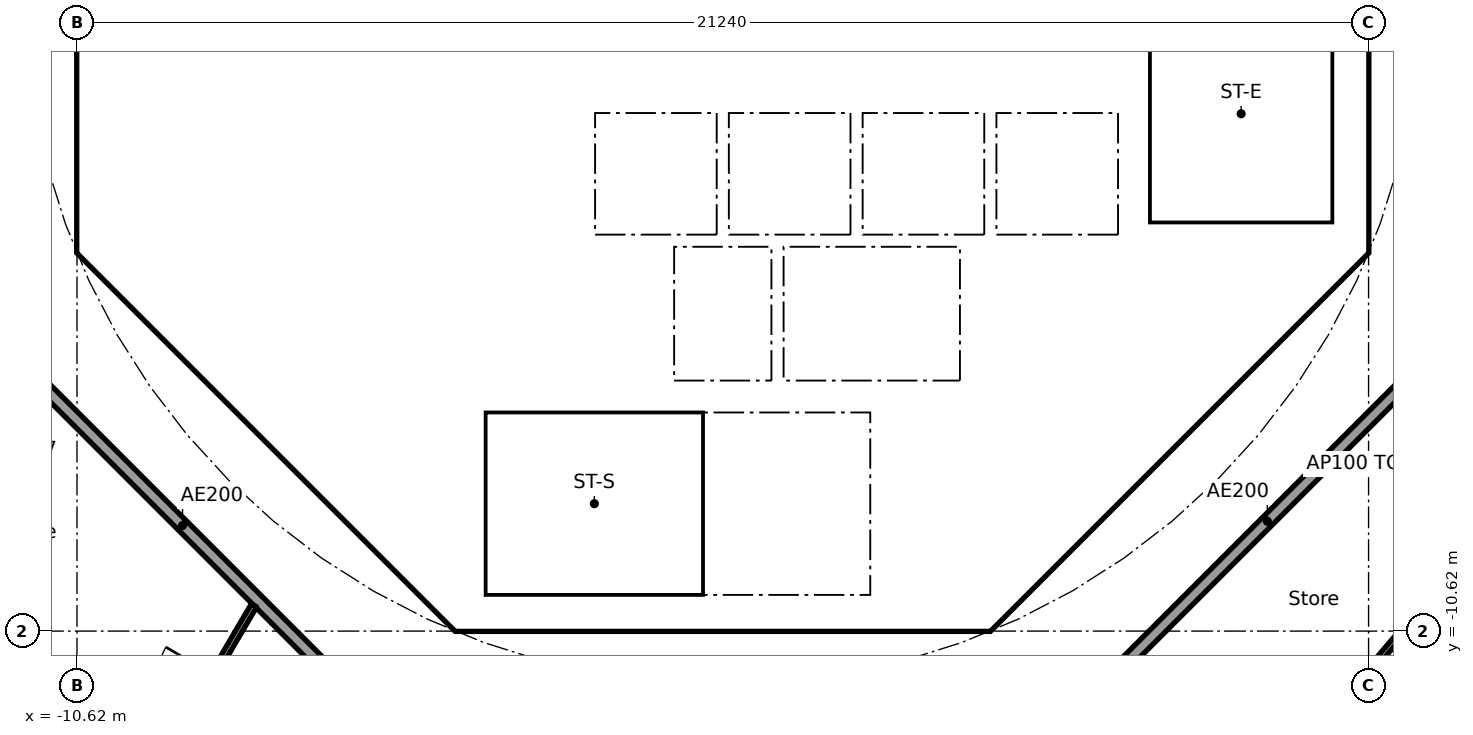
"""IFC4 building model, lengths in metres.
Left out: names, types, materials, properties, quantities, classifications, styles, units other than length and angle.
Written with IfcOpenShell. Run it as: python <this file> out.ifc"""

import sys

from ifc_helpers import new_model, si_unit, direction, frame, frame_2d, origin, place, context, subcontext, project, spatial, polyline, rectangle, outline, extrude, element, fill, save


model = new_model("IFC4")
c1 = context("Model", 3, precision=1e-05, world=origin(), true_north=direction((0.0, 1.0)))
c2 = subcontext(c1, "Body", "Model", "MODEL_VIEW")
j1 = project(units=[si_unit("LENGTHUNIT", "METRE"), si_unit("PLANEANGLEUNIT", "RADIAN")], contexts=[c1])
p1 = place(None, origin())
s1 = spatial("IfcSite", under=j1, at=p1, CompositionType="ELEMENT")
p2 = place(p1, origin())
s2 = spatial("IfcBuilding", under=s1, at=p2, CompositionType="ELEMENT")
p3 = place(p2, frame((0.0, 0.0, 227.0)))
s3 = spatial("IfcBuildingStorey", under=s2, at=p3, CompositionType="ELEMENT", Elevation=227.0)
p4 = place(p3, frame((-10.325, 3.801, 0.0), z_axis=(0.0, 0.0, 1.0), x_axis=(0.0, -1.0, 0.0)))
e1 = element("IfcWall", 1, at=p4, inside=s3, PredefinedType="SHEAR", context=c2, shape_type="SweptSolid", body=[
    extrude(rectangle(XDim=7.602, YDim=0.6, at=frame_2d((3.801, 0.0))), origin(), (0.0, 0.0, 1.0), 3.44),
])
p5 = place(p4, frame((0.651, 0.0, 0.0)))
e2 = element("IfcOpeningElement", 2, at=p5, cuts=e1, PredefinedType="OPENING", context=c2, shape_type="SweptSolid", body=[
    extrude(rectangle(XDim=1.5, YDim=2.1, at=frame_2d((0.75, 1.05))), frame((0.0, 0.31, 0.0), z_axis=(0.0, -1.0, 0.0), x_axis=(1.0, 0.0, 0.0)), (0.0, 0.0, 1.0), 0.62),
])
p6 = place(p4, frame((5.451, 0.0, 0.0)))
e3 = element("IfcOpeningElement", 3, at=p6, cuts=e1, PredefinedType="OPENING", context=c2, shape_type="SweptSolid", body=[
    extrude(rectangle(XDim=1.5, YDim=2.1, at=frame_2d((0.75, 1.05))), frame((0.0, 0.31, 0.0), z_axis=(0.0, -1.0, 0.0), x_axis=(1.0, 0.0, 0.0)), (0.0, 0.0, 1.0), 0.62),
])
p7 = place(p3, frame((-9.988, -4.613, 0.0), z_axis=(0.0, 0.0, 1.0), x_axis=(0.707106781187, -0.707106781187, 0.0)))
e4 = element("IfcWall", 4, at=p7, inside=s3, PredefinedType="SHEAR", context=c2, shape_type="SweptSolid", body=[
    extrude(rectangle(XDim=7.602, YDim=0.6, at=frame_2d((3.801, 0.0))), origin(), (0.0, 0.0, 1.0), 3.44),
])
p8 = place(p7, frame((6.151, 0.0, 0.0)))
e5 = element("IfcOpeningElement", 5, at=p8, cuts=e4, PredefinedType="OPENING", context=c2, shape_type="SweptSolid", body=[
    extrude(rectangle(XDim=1.1, YDim=2.1, at=frame_2d((0.55, 1.05))), frame((0.0, 0.31, 0.0), z_axis=(0.0, -1.0, 0.0), x_axis=(1.0, 0.0, 0.0)), (0.0, 0.0, 1.0), 0.62),
])
p9 = place(p3, frame((4.613, -9.988, 0.0), z_axis=(0.0, 0.0, 1.0), x_axis=(0.707106781187, 0.707106781187, 0.0)))
e6 = element("IfcWall", 6, at=p9, inside=s3, PredefinedType="SHEAR", context=c2, shape_type="SweptSolid", body=[
    extrude(rectangle(XDim=7.602, YDim=0.6, at=frame_2d((3.801, 0.0))), origin(), (0.0, 0.0, 1.0), 3.44),
])
p10 = place(p9, frame((3.201, 0.0, 0.0)))
e7 = element("IfcOpeningElement", 7, at=p10, cuts=e6, PredefinedType="OPENING", context=c2, shape_type="SweptSolid", body=[
    extrude(rectangle(XDim=1.2, YDim=2.1, at=frame_2d((0.6, 1.05))), frame((0.0, 0.31, 0.0), z_axis=(0.0, -1.0, 0.0), x_axis=(1.0, 0.0, 0.0)), (0.0, 0.0, 1.0), 0.62),
])
p11 = place(p3, frame((4.0, -10.025, 0.0), z_axis=(0.0, 0.0, 1.0), x_axis=(0.0, 1.0, 0.0)))
e8 = element("IfcWall", 8, at=p11, inside=s3, PredefinedType="SOLIDWALL", context=c2, shape_type="SweptSolid", body=[
    extrude(rectangle(XDim=3.0, YDim=0.2, at=frame_2d((1.5, 0.0))), origin(), (0.0, 0.0, 1.0), 3.44),
])
p12 = place(p11, frame((0.975, 0.0, 0.0)))
e9 = element("IfcOpeningElement", 9, at=p12, cuts=e8, PredefinedType="OPENING", context=c2, shape_type="SweptSolid", body=[
    extrude(rectangle(XDim=1.1, YDim=2.1, at=frame_2d((0.55, 1.05))), frame((0.0, 0.11, 0.0), z_axis=(0.0, -1.0, 0.0), x_axis=(1.0, 0.0, 0.0)), (0.0, 0.0, 1.0), 0.22),
])
p13 = place(p3, frame((-6.6, -7.427, 0.0), z_axis=(0.0, 0.0, 1.0), x_axis=(0.0, 1.0, 0.0)))
e10 = element("IfcWall", 10, at=p13, inside=s3, PredefinedType="PARTITIONING", context=c2, shape_type="SweptSolid", body=[
    extrude(rectangle(XDim=3.127, YDim=0.15, at=frame_2d((1.563, 0.0))), origin(), (0.0, 0.0, 1.0), 3.44),
])
p14 = place(p13, frame((1.076, 0.0, 0.0)))
e11 = element("IfcOpeningElement", 11, at=p14, cuts=e10, PredefinedType="OPENING", context=c2, shape_type="SweptSolid", body=[
    extrude(rectangle(XDim=0.9, YDim=2.1, at=frame_2d((0.45, 1.05))), frame((0.0, 0.085, 0.0), z_axis=(0.0, -1.0, 0.0), x_axis=(1.0, 0.0, 0.0)), (0.0, 0.0, 1.0), 0.17),
])
p15 = place(p3, frame((4.0, -6.5, 0.0), z_axis=(0.0, 0.0, 1.0), x_axis=(0.0, 1.0, 0.0)))
e12 = element("IfcWall", 12, at=p15, inside=s3, PredefinedType="SOLIDWALL", context=c2, shape_type="SweptSolid", body=[
    extrude(rectangle(XDim=2.2, YDim=0.2, at=frame_2d((1.1, 0.0))), origin(), (0.0, 0.0, 1.0), 3.44),
])
p16 = place(p15, frame((0.55, 0.0, 0.0)))
e13 = element("IfcOpeningElement", 13, at=p16, cuts=e12, PredefinedType="OPENING", context=c2, shape_type="SweptSolid", body=[
    extrude(rectangle(XDim=1.1, YDim=2.1, at=frame_2d((0.55, 1.05))), frame((0.0, 0.11, 0.0), z_axis=(0.0, -1.0, 0.0), x_axis=(1.0, 0.0, 0.0)), (0.0, 0.0, 1.0), 0.22),
])
p17 = place(p3, frame((-4.0, -6.5, 0.0), z_axis=(0.0, 0.0, 1.0), x_axis=(0.0, 1.0, 0.0)))
e14 = element("IfcWall", 14, at=p17, inside=s3, PredefinedType="SOLIDWALL", context=c2, shape_type="SweptSolid", body=[
    extrude(rectangle(XDim=2.2, YDim=0.2, at=frame_2d((1.1, 0.0))), origin(), (0.0, 0.0, 1.0), 3.44),
])
p18 = place(p17, frame((0.65, 0.0, 0.0)))
e15 = element("IfcOpeningElement", 15, at=p18, cuts=e14, PredefinedType="OPENING", context=c2, shape_type="SweptSolid", body=[
    extrude(rectangle(XDim=0.9, YDim=2.1, at=frame_2d((0.45, 1.05))), frame((0.0, 0.11, 0.0), z_axis=(0.0, -1.0, 0.0), x_axis=(1.0, 0.0, 0.0)), (0.0, 0.0, 1.0), 0.22),
])
p19 = place(p3, frame((-6.7, -2.0, 0.0), z_axis=(0.0, 0.0, 1.0), x_axis=(1.0, 0.0, 0.0)))
e16 = element("IfcWall", 16, at=p19, inside=s3, PredefinedType="SOLIDWALL", context=c2, shape_type="SweptSolid", body=[
    extrude(rectangle(XDim=13.4, YDim=0.2, at=frame_2d((6.7, 0.0))), origin(), (0.0, 0.0, 1.0), 3.44),
])
p20 = place(p19, frame((5.05, 0.0, 0.0)))
e17 = element("IfcOpeningElement", 17, at=p20, cuts=e16, PredefinedType="OPENING", context=c2, shape_type="SweptSolid", body=[
    extrude(rectangle(XDim=1.1, YDim=2.1, at=frame_2d((0.55, 1.05))), frame((0.0, 0.11, 0.0), z_axis=(0.0, -1.0, 0.0), x_axis=(1.0, 0.0, 0.0)), (0.0, 0.0, 1.0), 0.22),
])
p21 = place(p19, frame((7.25, 0.0, 0.0)))
e18 = element("IfcOpeningElement", 18, at=p21, cuts=e16, PredefinedType="OPENING", context=c2, shape_type="SweptSolid", body=[
    extrude(rectangle(XDim=1.1, YDim=2.1, at=frame_2d((0.55, 1.05))), frame((0.0, 0.11, 0.0), z_axis=(0.0, -1.0, 0.0), x_axis=(1.0, 0.0, 0.0)), (0.0, 0.0, 1.0), 0.22),
])
p22 = place(p19, frame((1.85, 0.0, 0.0)))
e19 = element("IfcOpeningElement", 19, at=p22, cuts=e16, PredefinedType="OPENING", context=c2, shape_type="SweptSolid", body=[
    extrude(rectangle(XDim=0.9, YDim=2.1, at=frame_2d((0.45, 1.05))), frame((0.0, 0.11, 0.0), z_axis=(0.0, -1.0, 0.0), x_axis=(1.0, 0.0, 0.0)), (0.0, 0.0, 1.0), 0.22),
])
p23 = place(p3, origin())
e20 = element("IfcWall", 20, at=p23, inside=s3, PredefinedType="SHEAR", context=c2, shape_type="SweptSolid", body=[
    extrude(outline(polyline([(-10.625, -3.801), (-10.025, -3.801), (-10.025, -4.152), (-9.776, -4.401), (-10.2, -4.825), (-10.625, -4.401), (-10.625, -3.801)])), origin(), (0.0, 0.0, 1.0), 3.44),
])
p24 = place(p3, origin())
e21 = element("IfcWall", 21, at=p24, inside=s3, PredefinedType="SHEAR", context=c2, shape_type="SweptSolid", body=[
    extrude(outline(polyline([(-4.152, -10.025), (4.152, -10.025), (4.401, -9.776), (4.825, -10.2), (4.401, -10.625), (-4.401, -10.625), (-4.825, -10.2), (-4.401, -9.776), (-4.152, -10.025)])), origin(), (0.0, 0.0, 1.0), 3.44),
])
p25 = place(p3, origin())
e22 = element("IfcWall", 22, at=p25, inside=s3, PredefinedType="SHEAR", context=c2, shape_type="SweptSolid", body=[
    extrude(outline(polyline([(9.776, -4.401), (10.025, -4.152), (10.025, -3.801), (10.025, 4.152), (9.776, 4.401), (10.2, 4.825), (10.625, 4.401), (10.625, -4.401), (10.2, -4.825), (9.776, -4.401)])), origin(), (0.0, 0.0, 1.0), 3.44),
])
p26 = place(p3, frame((-10.025, -4.0, 0.0), z_axis=(0.0, 0.0, 1.0), x_axis=(1.0, 0.0, 0.0)))
e23 = element("IfcWall", 23, at=p26, inside=s3, PredefinedType="PARTITIONING", context=c2, shape_type="SweptSolid", body=[
    extrude(rectangle(XDim=3.325, YDim=0.2, at=frame_2d((1.662, 0.0))), origin(), (0.0, 0.0, 1.0), 3.44),
])
for number, where, z_axis, x_axis in (
    (24, (-0.9, -6.5, 0.0), (0.0, 0.0, 1.0), (0.0, 1.0, 0.0)),
    (25, (0.9, -6.5, 0.0), (0.0, 0.0, 1.0), (0.0, 1.0, 0.0)),
):
    element("IfcWall", number, at=place(p3, frame(where, z_axis=z_axis, x_axis=x_axis)), inside=s3, PredefinedType="SOLIDWALL", context=c2, shape_type="SweptSolid", body=[
        extrude(rectangle(XDim=2.2, YDim=0.2, at=frame_2d((1.1, 0.0))), origin(), (0.0, 0.0, 1.0), 3.44),
    ])
p27 = place(p3, origin())
e26 = element("IfcWall", 26, at=p27, inside=s3, PredefinedType="SOLIDWALL", context=c2, shape_type="SweptSolid", body=[
    extrude(outline(polyline([(-6.7, -2.1), (-6.5, -2.1), (-6.5, -4.1), (-2.3, -4.1), (-2.3, -2.1), (-2.1, -2.1), (-2.1, -4.1), (-0.1, -4.1), (-0.1, -2.1), (0.1, -2.1), (0.1, -4.1), (2.1, -4.1), (2.1, -2.1), (2.3, -2.1), (2.3, -4.1), (4.3, -4.1), (4.3, -2.1), (4.5, -2.1), (4.5, -4.1), (6.5, -4.1), (6.5, -2.1), (6.7, -2.1), (6.7, -4.3), (-6.7, -4.3), (-6.7, -2.1)])), origin(), (0.0, 0.0, 1.0), 3.44),
])
p28 = place(p3, origin())
e27 = element("IfcWall", 27, at=p28, inside=s3, PredefinedType="SOLIDWALL", context=c2, shape_type="SweptSolid", body=[
    extrude(outline(polyline([(-3.9, -10.025), (-4.1, -10.025), (-4.1, -7.025), (-3.9, -7.025), (-3.9, -10.025)])), origin(), (0.0, 0.0, 1.0), 3.44),
])
p29 = place(p3, origin())
e28 = element("IfcWall", 28, at=p29, inside=s3, PredefinedType="SOLIDWALL", context=c2, shape_type="SweptSolid", body=[
    extrude(outline(polyline([(4.1, -7.025), (-4.1, -7.025), (-4.1, -6.5), (4.1, -6.5), (4.1, -7.025)])), origin(), (0.0, 0.0, 1.0), 3.44),
])
p30 = place(p3, origin())
e29 = element("IfcWall", 29, at=p30, inside=s3, PredefinedType="SOLIDWALL", context=c2, shape_type="SweptSolid", body=[
    extrude(outline(polyline([(7.025, -3.9), (6.7, -3.9), (6.7, 3.9), (7.025, 3.9), (7.025, -3.9)])), origin(), (0.0, 0.0, 1.0), 3.44),
])
p31 = place(p3, origin())
e30 = element("IfcWall", 30, at=p31, inside=s3, PredefinedType="SOLIDWALL", context=c2, shape_type="SweptSolid", body=[
    extrude(outline(polyline([(10.025, -4.1), (6.7, -4.1), (6.7, -3.9), (10.025, -3.9), (10.025, -4.1)])), origin(), (0.0, 0.0, 1.0), 3.44),
])
p32 = place(p3, frame((-12.635, -5.134, 0.0), z_axis=(0.0, 0.0, 1.0), x_axis=(0.707106781187, -0.707106781187, 0.0)))
e31 = element("IfcWall", 31, at=p32, inside=s3, PredefinedType="PARTITIONING", context=c2, shape_type="SweptSolid", body=[
    extrude(rectangle(XDim=10.609, YDim=0.2, at=frame_2d((5.305, 0.0))), origin(), (0.0, 0.0, 1.0), 3.44),
])
p33 = place(p3, frame((5.275, -12.494, 0.0), z_axis=(0.0, 0.0, 1.0), x_axis=(0.707106781187, 0.707106781187, 0.0)))
e32 = element("IfcWall", 32, at=p33, inside=s3, PredefinedType="PARTITIONING", context=c2, shape_type="SweptSolid", body=[
    extrude(rectangle(XDim=10.409, YDim=0.2, at=frame_2d((5.205, 0.0))), origin(), (0.0, 0.0, 1.0), 3.44),
])
p34 = place(p3, frame((-12.688, -10.27, 0.0), z_axis=(0.0, 0.0, 1.0), x_axis=(0.728268142903, -0.685292282192, 0.0)))
e33 = element("IfcWall", 33, at=p34, inside=s3, PredefinedType="PARTITIONING", context=c2, shape_type="SweptSolid", body=[
    extrude(rectangle(XDim=4.312, YDim=0.1, at=frame_2d((2.156, 0.0))), origin(), (0.0, 0.0, 1.0), 2.837),
])
p35 = place(p3, frame((-7.709, -10.198, 0.0), z_axis=(0.0, 0.0, 1.0), x_axis=(-0.507362999545, -0.861732433353, 0.0)))
e34 = element("IfcWall", 34, at=p35, inside=s3, PredefinedType="PARTITIONING", context=c2, shape_type="SweptSolid", body=[
    extrude(rectangle(XDim=7.499, YDim=0.1, at=frame_2d((3.749, 0.0))), origin(), (0.0, 0.0, 1.0), 2.762),
])
p36 = place(p35, frame((1.326, 0.0, 0.0)))
e35 = element("IfcOpeningElement", 35, at=p36, cuts=e34, PredefinedType="OPENING", context=c2, shape_type="SweptSolid", body=[
    extrude(rectangle(XDim=0.9, YDim=2.1, at=frame_2d((0.45, 1.05))), frame((0.0, 0.06, 0.0), z_axis=(0.0, -1.0, 0.0), x_axis=(1.0, 0.0, 0.0)), (0.0, 0.0, 1.0), 0.12),
])
p37 = place(p3, frame((10.753, -11.132, 0.0), z_axis=(0.0, 0.0, 1.0), x_axis=(0.646987675252, 0.762500457752, 0.0)))
e36 = element("IfcWall", 36, at=p37, inside=s3, PredefinedType="PARTITIONING", context=c2, shape_type="SweptSolid", body=[
    extrude(rectangle(XDim=6.309, YDim=0.1, at=frame_2d((3.154, 0.0))), origin(), (0.0, 0.0, 1.0), 2.837),
])
p38 = place(p20, origin())
e37 = element("IfcDoor", 37, at=p38, inside=s3, OperationType="DOUBLE_DOOR_SLIDING", PredefinedType="DOOR", context=c2, shape_type="SweptSolid", body=[
    extrude(rectangle(XDim=1.1, YDim=2.1, at=frame_2d((0.55, 1.05))), frame((0.0, 0.025, 0.0), z_axis=(0.0, -1.0, 0.0), x_axis=(1.0, 0.0, 0.0)), (0.0, 0.0, 1.0), 0.05),
])
fill(e17, e37)
p39 = place(p21, origin())
e38 = element("IfcDoor", 38, at=p39, inside=s3, OperationType="DOUBLE_DOOR_SLIDING", PredefinedType="DOOR", context=c2, shape_type="SweptSolid", body=[
    extrude(rectangle(XDim=1.1, YDim=2.1, at=frame_2d((0.55, 1.05))), frame((0.0, 0.025, 0.0), z_axis=(0.0, -1.0, 0.0), x_axis=(1.0, 0.0, 0.0)), (0.0, 0.0, 1.0), 0.05),
])
fill(e18, e38)
p40 = place(p16, origin())
e39 = element("IfcDoor", 39, at=p40, inside=s3, OperationType="DOUBLE_DOOR_SLIDING", PredefinedType="DOOR", context=c2, shape_type="SweptSolid", body=[
    extrude(rectangle(XDim=1.1, YDim=2.1, at=frame_2d((0.55, 1.05))), frame((0.0, 0.025, 0.0), z_axis=(0.0, -1.0, 0.0), x_axis=(1.0, 0.0, 0.0)), (0.0, 0.0, 1.0), 0.05),
])
fill(e13, e39)
p41 = place(p12, origin())
e40 = element("IfcDoor", 40, at=p41, inside=s3, OperationType="SINGLE_SWING_LEFT", PredefinedType="DOOR", context=c2, shape_type="SweptSolid", body=[
    extrude(rectangle(XDim=1.1, YDim=2.1, at=frame_2d((0.55, 1.05))), frame((0.0, 0.025, 0.0), z_axis=(0.0, -1.0, 0.0), x_axis=(1.0, 0.0, 0.0)), (0.0, 0.0, 1.0), 0.05),
])
fill(e9, e40)
p42 = place(p14, origin())
e41 = element("IfcDoor", 41, at=p42, inside=s3, OperationType="SINGLE_SWING_LEFT", PredefinedType="DOOR", context=c2, shape_type="SweptSolid", body=[
    extrude(rectangle(XDim=0.9, YDim=2.1, at=frame_2d((0.45, 1.05))), frame((0.0, 0.025, 0.0), z_axis=(0.0, -1.0, 0.0), x_axis=(1.0, 0.0, 0.0)), (0.0, 0.0, 1.0), 0.05),
])
fill(e11, e41)
p43 = place(p18, frame((0.9, 0.0, 0.0), x_axis=(-1.0, 0.0, 0.0)))
e42 = element("IfcDoor", 42, at=p43, inside=s3, OperationType="SINGLE_SWING_LEFT", PredefinedType="DOOR", context=c2, shape_type="SweptSolid", body=[
    extrude(rectangle(XDim=0.9, YDim=2.1, at=frame_2d((0.45, 1.05))), frame((0.0, 0.025, 0.0), z_axis=(0.0, -1.0, 0.0), x_axis=(1.0, 0.0, 0.0)), (0.0, 0.0, 1.0), 0.05),
])
fill(e15, e42)
p44 = place(p22, frame((0.9, 0.0, 0.0), x_axis=(-1.0, 0.0, 0.0)))
e43 = element("IfcDoor", 43, at=p44, inside=s3, OperationType="SINGLE_SWING_LEFT", PredefinedType="DOOR", context=c2, shape_type="SweptSolid", body=[
    extrude(rectangle(XDim=0.9, YDim=2.1, at=frame_2d((0.45, 1.05))), frame((0.0, 0.025, 0.0), z_axis=(0.0, -1.0, 0.0), x_axis=(1.0, 0.0, 0.0)), (0.0, 0.0, 1.0), 0.05),
])
fill(e19, e43)
p45 = place(p10, origin())
e44 = element("IfcDoor", 44, at=p45, inside=s3, OperationType="SINGLE_SWING_LEFT", PredefinedType="DOOR", context=c2, shape_type="SweptSolid", body=[
    extrude(rectangle(XDim=1.2, YDim=2.1, at=frame_2d((0.6, 1.05))), frame((0.0, 0.025, 0.0), z_axis=(0.0, -1.0, 0.0), x_axis=(1.0, 0.0, 0.0)), (0.0, 0.0, 1.0), 0.05),
])
fill(e7, e44)
p46 = place(p6, origin())
e45 = element("IfcDoor", 45, at=p46, inside=s3, OperationType="DOUBLE_DOOR_SINGLE_SWING", PredefinedType="DOOR", context=c2, shape_type="SweptSolid", body=[
    extrude(rectangle(XDim=1.5, YDim=2.1, at=frame_2d((0.75, 1.05))), frame((0.0, 0.025, 0.0), z_axis=(0.0, -1.0, 0.0), x_axis=(1.0, 0.0, 0.0)), (0.0, 0.0, 1.0), 0.05),
])
fill(e3, e45)
p47 = place(p8, origin())
e46 = element("IfcDoor", 46, at=p47, inside=s3, OperationType="SINGLE_SWING_LEFT", PredefinedType="DOOR", context=c2, shape_type="SweptSolid", body=[
    extrude(rectangle(XDim=1.1, YDim=2.1, at=frame_2d((0.55, 1.05))), frame((0.0, 0.025, 0.0), z_axis=(0.0, -1.0, 0.0), x_axis=(1.0, 0.0, 0.0)), (0.0, 0.0, 1.0), 0.05),
])
fill(e5, e46)
save(model, sys.argv[1])
